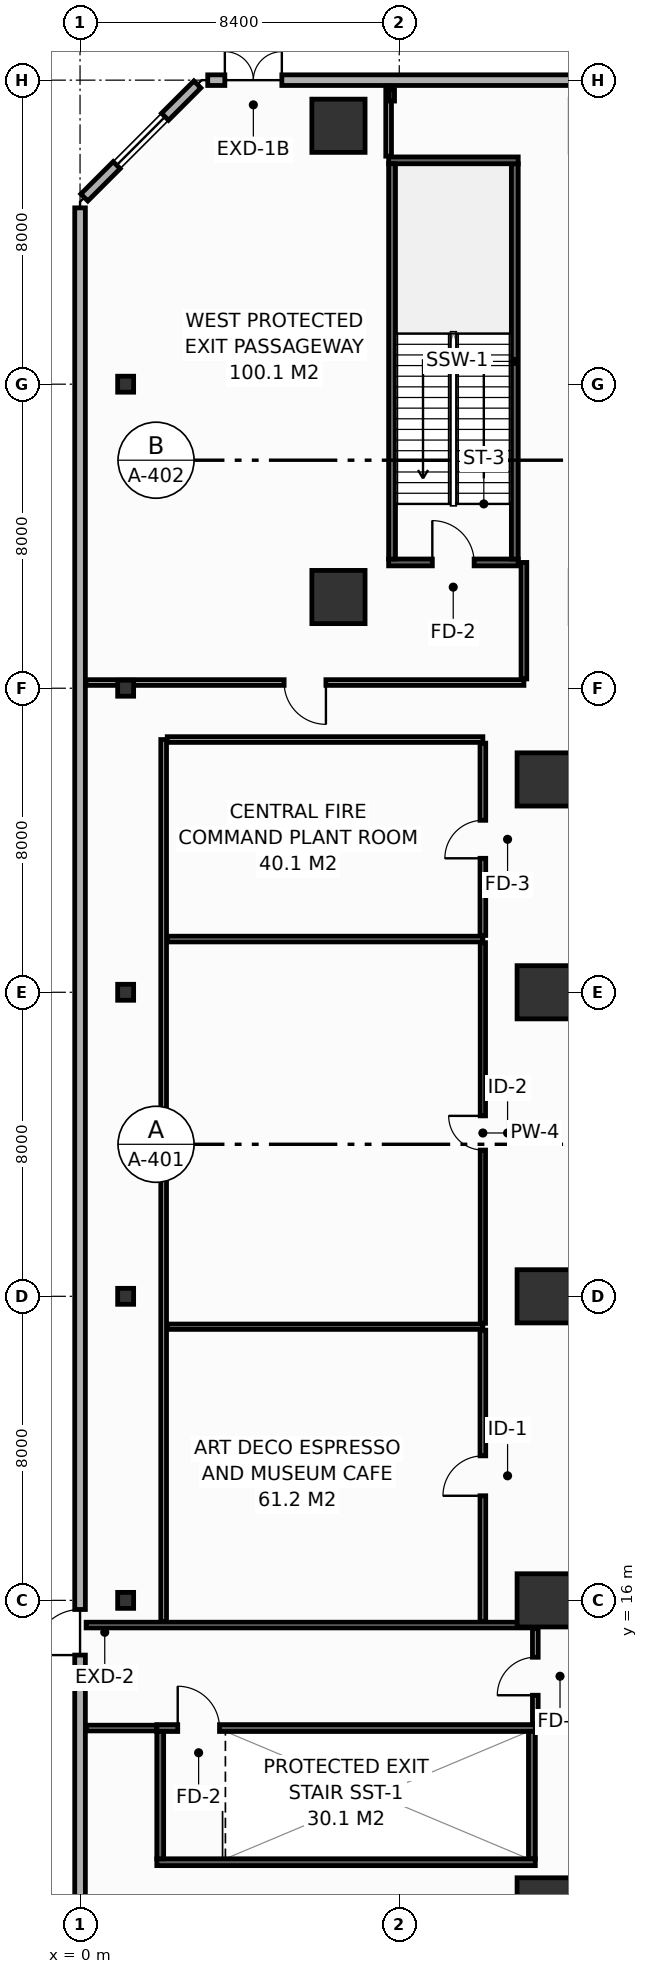
"""IFC4 building model, lengths in metres.
Left out: names, types, materials, properties, quantities, classifications, styles, units other than length and angle.
Written with IfcOpenShell. Run it as: python <this file> out.ifc"""

import sys

from ifc_helpers import new_model, si_unit, direction, frame, frame_2d, origin, origin_2d, place, context, subcontext, project, spatial, rectangle, hollow_rectangle, i_section, extrude, element, fill, save


model = new_model("IFC4")
c1 = context("Model", 3, precision=1e-05, world=origin(), true_north=direction((0.0, 1.0)))
c2 = subcontext(c1, "Body", "Model", "MODEL_VIEW")
j1 = project(units=[si_unit("LENGTHUNIT", "METRE"), si_unit("PLANEANGLEUNIT", "RADIAN")], contexts=[c1])
p1 = place(None, origin())
s1 = spatial("IfcSite", under=j1, at=p1, CompositionType="ELEMENT")
p2 = place(p1, origin())
s2 = spatial("IfcBuilding", under=s1, at=p2, CompositionType="ELEMENT")
p3 = place(p2, origin())
s3 = spatial("IfcBuildingStorey", under=s2, at=p3, CompositionType="ELEMENT", Elevation=0.0)
for number, where, z_axis, x_axis in (
    (1, (6.8, 54.8, 0.0), (0.0, 0.0, 1.0), (1.0, 0.0, 0.0)),
    (2, (6.8, 42.4, 0.0), (0.0, 0.0, 1.0), (1.0, 0.0, 0.0)),
    (3, (12.2, 8.0, 0.0), (0.0, 0.0, 1.0), (1.0, 0.0, 0.0)),
    (4, (12.2, 16.0, 0.0), (0.0, 0.0, 1.0), (1.0, 0.0, 0.0)),
    (5, (12.2, 24.0, 0.0), (0.0, 0.0, 1.0), (1.0, 0.0, 0.0)),
    (6, (12.2, 32.0, 0.0), (0.0, 0.0, 1.0), (1.0, 0.0, 0.0)),
    (7, (12.2, 37.6, 0.0), (0.0, 0.0, 1.0), (1.0, 0.0, 0.0)),
):
    element("IfcColumn", number, at=place(p3, frame(where, z_axis=z_axis, x_axis=x_axis)), inside=s3, PredefinedType="COLUMN", context=c2, shape_type="SweptSolid", body=[
        extrude(hollow_rectangle(XDim=1.4, YDim=1.4, WallThickness=0.065, at=origin_2d()), origin(), (0.0, 0.0, 1.0), 6.0),
    ])
for number, where, z_axis, x_axis in (
    (8, (1.2, 16.0, 0.0), (0.0, 0.0, 1.0), (1.0, 0.0, 0.0)),
    (9, (1.2, 24.0, 0.0), (0.0, 0.0, 1.0), (1.0, 0.0, 0.0)),
    (10, (1.2, 32.0, 0.0), (0.0, 0.0, 1.0), (1.0, 0.0, 0.0)),
    (11, (1.2, 40.0, 0.0), (0.0, 0.0, 1.0), (1.0, 0.0, 0.0)),
    (12, (1.2, 48.0, 0.0), (0.0, 0.0, 1.0), (1.0, 0.0, 0.0)),
):
    element("IfcColumn", number, at=place(p3, frame(where, z_axis=z_axis, x_axis=x_axis)), inside=s3, PredefinedType="COLUMN", context=c2, shape_type="SweptSolid", body=[
        extrude(i_section(OverallWidth=0.42, OverallDepth=0.42, WebThickness=0.02, FlangeThickness=0.035, FilletRadius=0.022, at=origin_2d()), origin(), (0.0, 0.0, 1.0), 6.0),
    ])
p4 = place(p3, frame((8.2, 55.6, 0.0), z_axis=(0.0, 0.0, 1.0), x_axis=(1.0, 0.0, 0.0)))
e13 = element("IfcColumn", 13, at=p4, inside=s3, PredefinedType="PILASTER", context=c2, shape_type="SweptSolid", body=[
    extrude(hollow_rectangle(XDim=0.15, YDim=0.3, WallThickness=0.01, at=origin_2d()), origin(), (0.0, 0.0, 1.0), 6.0),
])
p5 = place(p3, frame((8.12, 43.31, 0.0), z_axis=(0.0, 0.0, 1.0), x_axis=(1.0, 0.0, 0.0)))
e14 = element("IfcWall", 14, at=p5, inside=s3, PredefinedType="SHEAR", context=c2, shape_type="SweptSolid", body=[
    extrude(rectangle(XDim=3.41, YDim=0.18, at=frame_2d((1.705, 0.0))), origin(), (0.0, 0.0, 1.0), 5.7),
])
p6 = place(p5, frame((1.15, 0.0, 0.0)))
e15 = element("IfcOpeningElement", 15, at=p6, cuts=e14, PredefinedType="OPENING", context=c2, shape_type="SweptSolid", body=[
    extrude(rectangle(XDim=1.1, YDim=2.15, at=frame_2d((0.55, 1.075))), frame((0.0, 0.1, 0.0), z_axis=(0.0, -1.0, 0.0), x_axis=(1.0, 0.0, 0.0)), (0.0, 0.0, 1.0), 0.2),
])
p7 = place(p3, frame((11.44, 43.4, 0.0), z_axis=(0.0, 0.0, 1.0), x_axis=(0.0, 1.0, 0.0)))
e16 = element("IfcWall", 16, at=p7, inside=s3, PredefinedType="SHEAR", context=c2, shape_type="SweptSolid", body=[
    extrude(rectangle(XDim=10.4, YDim=0.18, at=frame_2d((5.2, 0.0))), origin(), (0.0, 0.0, 1.0), 5.7),
])
p8 = place(p3, frame((11.53, 53.89, 0.0), z_axis=(0.0, 0.0, 1.0), x_axis=(-1.0, 0.0, 0.0)))
e17 = element("IfcWall", 17, at=p8, inside=s3, PredefinedType="SHEAR", context=c2, shape_type="SweptSolid", body=[
    extrude(rectangle(XDim=3.41, YDim=0.18, at=frame_2d((1.705, 0.0))), origin(), (0.0, 0.0, 1.0), 5.7),
])
p9 = place(p3, frame((8.21, 53.8, 0.0), z_axis=(0.0, 0.0, 1.0), x_axis=(0.0, -1.0, 0.0)))
e18 = element("IfcWall", 18, at=p9, inside=s3, PredefinedType="SHEAR", context=c2, shape_type="SweptSolid", body=[
    extrude(rectangle(XDim=10.4, YDim=0.18, at=frame_2d((5.2, 0.0))), origin(), (0.0, 0.0, 1.0), 5.7),
])
p10 = place(p3, frame((2.02, 12.64, 0.0), z_axis=(0.0, 0.0, 1.0), x_axis=(1.0, 0.0, 0.0)))
e19 = element("IfcWall", 19, at=p10, inside=s3, PredefinedType="SHEAR", context=c2, shape_type="SweptSolid", body=[
    extrude(rectangle(XDim=9.96, YDim=0.18, at=frame_2d((4.98, 0.0))), origin(), (0.0, 0.0, 1.0), 5.7),
])
p11 = place(p10, frame((0.55, 0.0, 0.0)))
e20 = element("IfcOpeningElement", 20, at=p11, cuts=e19, PredefinedType="OPENING", context=c2, shape_type="SweptSolid", body=[
    extrude(rectangle(XDim=1.1, YDim=2.15, at=frame_2d((0.55, 1.075))), frame((0.0, 0.1, 0.0), z_axis=(0.0, -1.0, 0.0), x_axis=(1.0, 0.0, 0.0)), (0.0, 0.0, 1.0), 0.2),
])
p12 = place(p3, frame((11.89, 12.55, 0.0), z_axis=(0.0, 0.0, 1.0), x_axis=(0.0, -1.0, 0.0)))
e21 = element("IfcWall", 21, at=p12, inside=s3, PredefinedType="SHEAR", context=c2, shape_type="SweptSolid", body=[
    extrude(rectangle(XDim=3.35, YDim=0.18, at=frame_2d((1.675, 0.0))), origin(), (0.0, 0.0, 1.0), 5.7),
])
p13 = place(p3, frame((11.98, 9.11, 0.0), z_axis=(0.0, 0.0, 1.0), x_axis=(-1.0, 0.0, 0.0)))
e22 = element("IfcWall", 22, at=p13, inside=s3, PredefinedType="SHEAR", context=c2, shape_type="SweptSolid", body=[
    extrude(rectangle(XDim=9.96, YDim=0.18, at=frame_2d((4.98, 0.0))), origin(), (0.0, 0.0, 1.0), 5.7),
])
p14 = place(p3, frame((2.11, 9.2, 0.0), z_axis=(0.0, 0.0, 1.0), x_axis=(0.0, 1.0, 0.0)))
e23 = element("IfcWall", 23, at=p14, inside=s3, PredefinedType="SHEAR", context=c2, shape_type="SweptSolid", body=[
    extrude(rectangle(XDim=3.35, YDim=0.18, at=frame_2d((1.675, 0.0))), origin(), (0.0, 0.0, 1.0), 5.7),
])
p15 = place(p3, frame((3.36, 56.0, 0.0), z_axis=(0.0, 0.0, 1.0), x_axis=(1.0, 0.0, 0.0)))
e24 = element("IfcWall", 24, at=p15, inside=s3, PredefinedType="STANDARD", context=c2, shape_type="SweptSolid", body=[
    extrude(rectangle(XDim=53.28, YDim=0.28, at=frame_2d((26.64, 0.0))), origin(), (0.0, 0.0, 1.0), 5.7),
])
p16 = place(p15, frame((0.45, 0.0, 0.0)))
e25 = element("IfcOpeningElement", 25, at=p16, cuts=e24, PredefinedType="OPENING", context=c2, shape_type="SweptSolid", body=[
    extrude(rectangle(XDim=1.5, YDim=2.35, at=frame_2d((0.75, 1.175))), frame((0.0, 0.15, 0.0), z_axis=(0.0, -1.0, 0.0), x_axis=(1.0, 0.0, 0.0)), (0.0, 0.0, 1.0), 0.3),
])
p17 = place(p15, frame((47.4, 0.0, 0.0)))
e26 = element("IfcOpeningElement", 26, at=p17, cuts=e24, PredefinedType="OPENING", context=c2, shape_type="SweptSolid", body=[
    extrude(rectangle(XDim=1.2, YDim=2.25, at=frame_2d((0.6, 1.125))), frame((0.0, 0.15, 0.0), z_axis=(0.0, -1.0, 0.0), x_axis=(1.0, 0.0, 0.0)), (0.0, 0.0, 1.0), 0.3),
])
p18 = place(p3, frame((0.113, 52.913, 0.0), z_axis=(0.0, 0.0, 1.0), x_axis=(0.707106781187, 0.707106781187, 0.0)))
e27 = element("IfcWall", 27, at=p18, inside=s3, PredefinedType="STANDARD", context=c2, shape_type="SweptSolid", body=[
    extrude(rectangle(XDim=4.206, YDim=0.26, at=frame_2d((2.103, 0.0))), origin(), (0.0, 0.0, 1.0), 5.7),
])
p19 = place(p18, frame((1.203, 0.0, 0.9)))
e28 = element("IfcOpeningElement", 28, at=p19, cuts=e27, PredefinedType="OPENING", context=c2, shape_type="SweptSolid", body=[
    extrude(rectangle(XDim=1.8, YDim=1.9, at=frame_2d((0.9, 0.95))), frame((0.0, 0.14, 0.0), z_axis=(0.0, -1.0, 0.0), x_axis=(1.0, 0.0, 0.0)), (0.0, 0.0, 1.0), 0.28),
])
p20 = place(p3, frame((0.0, 3.36, 0.0), z_axis=(0.0, 0.0, 1.0), x_axis=(0.0, 1.0, 0.0)))
e29 = element("IfcWall", 29, at=p20, inside=s3, PredefinedType="STANDARD", context=c2, shape_type="SweptSolid", body=[
    extrude(rectangle(XDim=49.28, YDim=0.28, at=frame_2d((24.64, 0.0))), origin(), (0.0, 0.0, 1.0), 5.7),
])
p21 = place(p20, frame((11.2, 0.0, 0.0)))
e30 = element("IfcOpeningElement", 30, at=p21, cuts=e29, PredefinedType="OPENING", context=c2, shape_type="SweptSolid", body=[
    extrude(rectangle(XDim=1.2, YDim=2.25, at=frame_2d((0.6, 1.125))), frame((0.0, 0.15, 0.0), z_axis=(0.0, -1.0, 0.0), x_axis=(1.0, 0.0, 0.0)), (0.0, 0.0, 1.0), 0.3),
])
p22 = place(p3, frame((0.16, 15.35, 0.0), z_axis=(0.0, 0.0, 1.0), x_axis=(1.0, 0.0, 0.0)))
e31 = element("IfcWall", 31, at=p22, inside=s3, PredefinedType="PARTITIONING", context=c2, shape_type="SweptSolid", body=[
    extrude(rectangle(XDim=11.82, YDim=0.15, at=frame_2d((5.91, 0.0))), origin(), (0.0, 0.0, 1.0), 4.785),
])
p23 = place(p3, frame((2.02, 12.64, 0.0), z_axis=(0.0, 0.0, 1.0), x_axis=(-1.0, 0.0, 0.0)))
e32 = element("IfcWall", 32, at=p23, inside=s3, PredefinedType="PARTITIONING", context=c2, shape_type="SweptSolid", body=[
    extrude(rectangle(XDim=1.86, YDim=0.15, at=frame_2d((0.93, 0.0))), origin(), (0.0, 0.0, 1.0), 4.785),
])
p24 = place(p3, frame((11.98, 12.75, 0.0), z_axis=(0.0, 0.0, 1.0), x_axis=(0.0, 1.0, 0.0)))
e33 = element("IfcWall", 33, at=p24, inside=s3, PredefinedType="PARTITIONING", context=c2, shape_type="SweptSolid", body=[
    extrude(rectangle(XDim=2.505, YDim=0.15, at=frame_2d((1.252, 0.0))), origin(), (0.0, 0.0, 1.0), 4.785),
])
p25 = place(p24, frame((0.753, 0.0, 0.0)))
e34 = element("IfcOpeningElement", 34, at=p25, cuts=e33, PredefinedType="OPENING", context=c2, shape_type="SweptSolid", body=[
    extrude(rectangle(XDim=1.0, YDim=2.15, at=frame_2d((0.5, 1.075))), frame((0.0, 0.085, 0.0), z_axis=(0.0, -1.0, 0.0), x_axis=(1.0, 0.0, 0.0)), (0.0, 0.0, 1.0), 0.17),
])
p26 = place(p3, frame((11.68, 40.15, 0.0), z_axis=(0.0, 0.0, 1.0), x_axis=(-1.0, 0.0, 0.0)))
e35 = element("IfcWall", 35, at=p26, inside=s3, PredefinedType="PARTITIONING", context=c2, shape_type="SweptSolid", body=[
    extrude(rectangle(XDim=11.52, YDim=0.15, at=frame_2d((5.76, 0.0))), origin(), (0.0, 0.0, 1.0), 4.785),
])
p27 = place(p26, frame((5.21, 0.0, 0.0)))
e36 = element("IfcOpeningElement", 36, at=p27, cuts=e35, PredefinedType="OPENING", context=c2, shape_type="SweptSolid", body=[
    extrude(rectangle(XDim=1.1, YDim=2.15, at=frame_2d((0.55, 1.075))), frame((0.0, 0.085, 0.0), z_axis=(0.0, -1.0, 0.0), x_axis=(1.0, 0.0, 0.0)), (0.0, 0.0, 1.0), 0.17),
])
p28 = place(p3, frame((11.68, 40.245, 0.0), z_axis=(0.0, 0.0, 1.0), x_axis=(0.0, 1.0, 0.0)))
e37 = element("IfcWall", 37, at=p28, inside=s3, PredefinedType="PARTITIONING", context=c2, shape_type="SweptSolid", body=[
    extrude(rectangle(XDim=3.065, YDim=0.15, at=frame_2d((1.532, 0.0))), origin(), (0.0, 0.0, 1.0), 4.885),
])
p29 = place(p3, frame((8.12, 54.0, 0.0), z_axis=(0.0, 0.0, 1.0), x_axis=(0.0, 1.0, 0.0)))
e38 = element("IfcWall", 38, at=p29, inside=s3, PredefinedType="PARTITIONING", context=c2, shape_type="SweptSolid", body=[
    extrude(rectangle(XDim=1.84, YDim=0.15, at=frame_2d((0.92, 0.0))), origin(), (0.0, 0.0, 1.0), 4.985),
])
p30 = place(p3, frame((2.2, 15.445, 0.0), z_axis=(0.0, 0.0, 1.0), x_axis=(0.0, 1.0, 0.0)))
e39 = element("IfcWall", 39, at=p30, inside=s3, PredefinedType="PARTITIONING", context=c2, shape_type="SweptSolid", body=[
    extrude(rectangle(XDim=23.205, YDim=0.15, at=frame_2d((11.603, 0.0))), origin(), (0.0, 0.0, 1.0), 4.785),
])
p31 = place(p3, frame((2.295, 23.2, 0.0), z_axis=(0.0, 0.0, 1.0), x_axis=(1.0, 0.0, 0.0)))
e40 = element("IfcWall", 40, at=p31, inside=s3, PredefinedType="PARTITIONING", context=c2, shape_type="SweptSolid", body=[
    extrude(rectangle(XDim=8.305, YDim=0.14, at=frame_2d((4.153, 0.0))), origin(), (0.0, 0.0, 1.0), 5.7),
])
for number, where, z_axis, x_axis in (
    (41, (2.295, 33.4, 0.0), (0.0, 0.0, 1.0), (1.0, 0.0, 0.0)),
    (42, (2.295, 38.65, 0.0), (0.0, 0.0, 1.0), (1.0, 0.0, 0.0)),
):
    element("IfcWall", number, at=place(p3, frame(where, z_axis=z_axis, x_axis=x_axis)), inside=s3, PredefinedType="PARTITIONING", context=c2, shape_type="SweptSolid", body=[
        extrude(rectangle(XDim=8.305, YDim=0.15, at=frame_2d((4.153, 0.0))), origin(), (0.0, 0.0, 1.0), 5.7),
    ])
p32 = place(p3, frame((10.6, 15.445, 0.0), z_axis=(0.0, 0.0, 1.0), x_axis=(0.0, 1.0, 0.0)))
e43 = element("IfcWall", 43, at=p32, inside=s3, PredefinedType="PARTITIONING", context=c2, shape_type="SweptSolid", body=[
    extrude(rectangle(XDim=7.665, YDim=0.15, at=frame_2d((3.833, 0.0))), origin(), (0.0, 0.0, 1.0), 4.785),
])
p33 = place(p32, frame((3.307, 0.0, 0.0)))
e44 = element("IfcOpeningElement", 44, at=p33, cuts=e43, PredefinedType="OPENING", context=c2, shape_type="SweptSolid", body=[
    extrude(rectangle(XDim=1.05, YDim=2.15, at=frame_2d((0.525, 1.075))), frame((0.0, 0.085, 0.0), z_axis=(0.0, -1.0, 0.0), x_axis=(1.0, 0.0, 0.0)), (0.0, 0.0, 1.0), 0.17),
])
p34 = place(p3, frame((10.6, 23.29, 0.0), z_axis=(0.0, 0.0, 1.0), x_axis=(0.0, 1.0, 0.0)))
e45 = element("IfcWall", 45, at=p34, inside=s3, PredefinedType="PARTITIONING", context=c2, shape_type="SweptSolid", body=[
    extrude(rectangle(XDim=10.015, YDim=0.14, at=frame_2d((5.007, 0.0))), origin(), (0.0, 0.0, 1.0), 4.785),
])
p35 = place(p34, frame((4.558, 0.0, 0.0)))
e46 = element("IfcOpeningElement", 46, at=p35, cuts=e45, PredefinedType="OPENING", context=c2, shape_type="SweptSolid", body=[
    extrude(rectangle(XDim=0.9, YDim=2.1, at=frame_2d((0.45, 1.05))), frame((0.0, 0.08, 0.0), z_axis=(0.0, -1.0, 0.0), x_axis=(1.0, 0.0, 0.0)), (0.0, 0.0, 1.0), 0.16),
])
p36 = place(p3, frame((10.6, 33.495, 0.0), z_axis=(0.0, 0.0, 1.0), x_axis=(0.0, 1.0, 0.0)))
e47 = element("IfcWall", 47, at=p36, inside=s3, PredefinedType="PARTITIONING", context=c2, shape_type="SweptSolid", body=[
    extrude(rectangle(XDim=5.06, YDim=0.15, at=frame_2d((2.53, 0.0))), origin(), (0.0, 0.0, 1.0), 5.7),
])
p37 = place(p36, frame((2.03, 0.0, 0.0)))
e48 = element("IfcOpeningElement", 48, at=p37, cuts=e47, PredefinedType="OPENING", context=c2, shape_type="SweptSolid", body=[
    extrude(rectangle(XDim=1.0, YDim=2.15, at=frame_2d((0.5, 1.075))), frame((0.0, 0.085, 0.0), z_axis=(0.0, -1.0, 0.0), x_axis=(1.0, 0.0, 0.0)), (0.0, 0.0, 1.0), 0.17),
])
p38 = place(p6, origin())
e49 = element("IfcDoor", 49, at=p38, inside=s3, OperationType="SINGLE_SWING_LEFT", PredefinedType="DOOR", context=c2, shape_type="SweptSolid", body=[
    extrude(rectangle(XDim=1.1, YDim=2.15, at=frame_2d((0.55, 1.075))), frame((0.0, 0.025, 0.0), z_axis=(0.0, -1.0, 0.0), x_axis=(1.0, 0.0, 0.0)), (0.0, 0.0, 1.0), 0.05),
])
fill(e15, e49)
p39 = place(p11, origin())
e50 = element("IfcDoor", 50, at=p39, inside=s3, OperationType="SINGLE_SWING_LEFT", PredefinedType="DOOR", context=c2, shape_type="SweptSolid", body=[
    extrude(rectangle(XDim=1.1, YDim=2.15, at=frame_2d((0.55, 1.075))), frame((0.0, 0.025, 0.0), z_axis=(0.0, -1.0, 0.0), x_axis=(1.0, 0.0, 0.0)), (0.0, 0.0, 1.0), 0.05),
])
fill(e20, e50)
p40 = place(p16, origin())
e51 = element("IfcDoor", 51, at=p40, inside=s3, OperationType="DOUBLE_DOOR_SINGLE_SWING", PredefinedType="DOOR", context=c2, shape_type="SweptSolid", body=[
    extrude(rectangle(XDim=1.5, YDim=2.35, at=frame_2d((0.75, 1.175))), frame((0.0, 0.025, 0.0), z_axis=(0.0, -1.0, 0.0), x_axis=(1.0, 0.0, 0.0)), (0.0, 0.0, 1.0), 0.05),
])
fill(e25, e51)
p41 = place(p19, origin())
e52 = element("IfcWindow", 52, at=p41, inside=s3, PartitioningType="SINGLE_PANEL", PredefinedType="WINDOW", context=c2, shape_type="SweptSolid", body=[
    extrude(rectangle(XDim=1.8, YDim=1.9, at=frame_2d((0.9, 0.95))), frame((0.0, 0.03, 0.0), z_axis=(0.0, -1.0, 0.0), x_axis=(1.0, 0.0, 0.0)), (0.0, 0.0, 1.0), 0.06),
])
fill(e28, e52)
p42 = place(p21, origin())
e53 = element("IfcDoor", 53, at=p42, inside=s3, OperationType="SINGLE_SWING_LEFT", PredefinedType="DOOR", context=c2, shape_type="SweptSolid", body=[
    extrude(rectangle(XDim=1.2, YDim=2.25, at=frame_2d((0.6, 1.125))), frame((0.0, 0.025, 0.0), z_axis=(0.0, -1.0, 0.0), x_axis=(1.0, 0.0, 0.0)), (0.0, 0.0, 1.0), 0.05),
])
fill(e30, e53)
p43 = place(p25, origin())
e54 = element("IfcDoor", 54, at=p43, inside=s3, OperationType="SINGLE_SWING_LEFT", PredefinedType="DOOR", context=c2, shape_type="SweptSolid", body=[
    extrude(rectangle(XDim=1.0, YDim=2.15, at=frame_2d((0.5, 1.075))), frame((0.0, 0.025, 0.0), z_axis=(0.0, -1.0, 0.0), x_axis=(1.0, 0.0, 0.0)), (0.0, 0.0, 1.0), 0.05),
])
fill(e34, e54)
p44 = place(p27, origin())
e55 = element("IfcDoor", 55, at=p44, inside=s3, OperationType="SINGLE_SWING_LEFT", PredefinedType="DOOR", context=c2, shape_type="SweptSolid", body=[
    extrude(rectangle(XDim=1.1, YDim=2.15, at=frame_2d((0.55, 1.075))), frame((0.0, 0.025, 0.0), z_axis=(0.0, -1.0, 0.0), x_axis=(1.0, 0.0, 0.0)), (0.0, 0.0, 1.0), 0.05),
])
fill(e36, e55)
p45 = place(p33, origin())
e56 = element("IfcDoor", 56, at=p45, inside=s3, OperationType="SINGLE_SWING_LEFT", PredefinedType="DOOR", context=c2, shape_type="SweptSolid", body=[
    extrude(rectangle(XDim=1.05, YDim=2.15, at=frame_2d((0.525, 1.075))), frame((0.0, 0.025, 0.0), z_axis=(0.0, -1.0, 0.0), x_axis=(1.0, 0.0, 0.0)), (0.0, 0.0, 1.0), 0.05),
])
fill(e44, e56)
p46 = place(p35, origin())
e57 = element("IfcDoor", 57, at=p46, inside=s3, OperationType="SINGLE_SWING_RIGHT", PredefinedType="DOOR", context=c2, shape_type="SweptSolid", body=[
    extrude(rectangle(XDim=0.9, YDim=2.1, at=frame_2d((0.45, 1.05))), frame((0.0, 0.025, 0.0), z_axis=(0.0, -1.0, 0.0), x_axis=(1.0, 0.0, 0.0)), (0.0, 0.0, 1.0), 0.05),
])
fill(e46, e57)
p47 = place(p37, origin())
e58 = element("IfcDoor", 58, at=p47, inside=s3, OperationType="SINGLE_SWING_LEFT", PredefinedType="DOOR", context=c2, shape_type="SweptSolid", body=[
    extrude(rectangle(XDim=1.0, YDim=2.15, at=frame_2d((0.5, 1.075))), frame((0.0, 0.025, 0.0), z_axis=(0.0, -1.0, 0.0), x_axis=(1.0, 0.0, 0.0)), (0.0, 0.0, 1.0), 0.05),
])
fill(e48, e58)
save(model, sys.argv[1])
